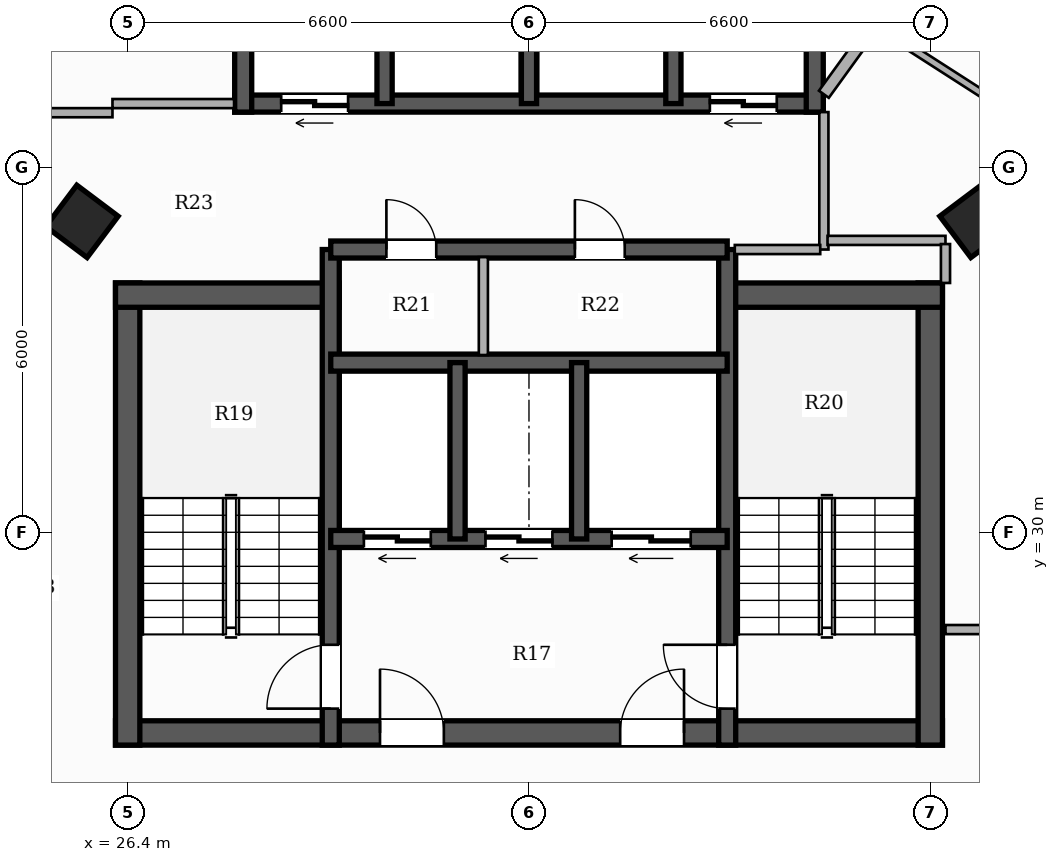
"""IFC4 building model, lengths in metres.
Left out: names, types, materials, properties, quantities, classifications, styles, units other than length and angle.
Written with IfcOpenShell. Run it as: python <this file> out.ifc"""

import sys

from ifc_helpers import new_model, si_unit, direction, frame, frame_2d, origin, origin_2d, place, context, subcontext, project, spatial, rectangle, hollow_rectangle, extrude, element, fill, save


model = new_model("IFC4")
c1 = context("Model", 3, precision=1e-05, world=origin(), true_north=direction((0.0, 1.0)))
c2 = subcontext(c1, "Body", "Model", "MODEL_VIEW")
j1 = project(units=[si_unit("LENGTHUNIT", "METRE"), si_unit("PLANEANGLEUNIT", "RADIAN")], contexts=[c1])
p1 = place(None, origin())
s1 = spatial("IfcSite", under=j1, at=p1, CompositionType="ELEMENT")
p2 = place(p1, origin())
s2 = spatial("IfcBuilding", under=s1, at=p2, CompositionType="ELEMENT")
p3 = place(p2, frame((0.0, 0.0, 173.75)))
s3 = spatial("IfcBuildingStorey", under=s2, at=p3, CompositionType="ELEMENT", Elevation=173.75)
p4 = place(p3, frame((26.2, 26.7, 0.0), z_axis=(0.0, 0.0, 1.0), x_axis=(1.0, 0.0, 0.0)))
e1 = element("IfcWall", 1, at=p4, inside=s3, PredefinedType="SHEAR", context=c2, shape_type="SweptSolid", body=[
    extrude(rectangle(XDim=13.6, YDim=0.4, at=frame_2d((6.8, 0.0))), origin(), (0.0, 0.0, 1.0), 3.3),
])
p5 = place(p4, frame((4.35, 0.0, 0.0)))
e2 = element("IfcOpeningElement", 2, at=p5, cuts=e1, PredefinedType="OPENING", context=c2, shape_type="SweptSolid", body=[
    extrude(rectangle(XDim=1.05, YDim=2.15, at=frame_2d((0.525, 1.075))), frame((0.0, 0.21, 0.0), z_axis=(0.0, -1.0, 0.0), x_axis=(1.0, 0.0, 0.0)), (0.0, 0.0, 1.0), 0.42),
])
p6 = place(p4, frame((8.3, 0.0, 0.0)))
e3 = element("IfcOpeningElement", 3, at=p6, cuts=e1, PredefinedType="OPENING", context=c2, shape_type="SweptSolid", body=[
    extrude(rectangle(XDim=1.05, YDim=2.15, at=frame_2d((0.525, 1.075))), frame((0.0, 0.21, 0.0), z_axis=(0.0, -1.0, 0.0), x_axis=(1.0, 0.0, 0.0)), (0.0, 0.0, 1.0), 0.42),
])
p7 = place(p3, frame((26.4, 26.5, 0.0), z_axis=(0.0, 0.0, 1.0), x_axis=(0.0, 1.0, 0.0)))
e4 = element("IfcWall", 4, at=p7, inside=s3, PredefinedType="SHEAR", context=c2, shape_type="SweptSolid", body=[
    extrude(rectangle(XDim=7.6, YDim=0.4, at=frame_2d((3.8, 0.0))), origin(), (0.0, 0.0, 1.0), 3.3),
])
p8 = place(p3, frame((26.2, 33.9, 0.0), z_axis=(0.0, 0.0, 1.0), x_axis=(1.0, 0.0, 0.0)))
e5 = element("IfcWall", 5, at=p8, inside=s3, PredefinedType="SHEAR", context=c2, shape_type="SweptSolid", body=[
    extrude(rectangle(XDim=3.68, YDim=0.4, at=frame_2d((1.84, 0.0))), origin(), (0.0, 0.0, 1.0), 3.3),
])
p9 = place(p3, frame((39.6, 26.5, 0.0), z_axis=(0.0, 0.0, 1.0), x_axis=(0.0, 1.0, 0.0)))
e6 = element("IfcWall", 6, at=p9, inside=s3, PredefinedType="SHEAR", context=c2, shape_type="SweptSolid", body=[
    extrude(rectangle(XDim=7.6, YDim=0.4, at=frame_2d((3.8, 0.0))), origin(), (0.0, 0.0, 1.0), 3.3),
])
p10 = place(p3, frame((36.12, 33.9, 0.0), z_axis=(0.0, 0.0, 1.0), x_axis=(1.0, 0.0, 0.0)))
e7 = element("IfcWall", 7, at=p10, inside=s3, PredefinedType="SHEAR", context=c2, shape_type="SweptSolid", body=[
    extrude(rectangle(XDim=3.68, YDim=0.4, at=frame_2d((1.84, 0.0))), origin(), (0.0, 0.0, 1.0), 3.3),
])
p11 = place(p3, frame((29.74, 26.5, 0.0), z_axis=(0.0, 0.0, 1.0), x_axis=(0.0, 1.0, 0.0)))
e8 = element("IfcWall", 8, at=p11, inside=s3, PredefinedType="SHEAR", context=c2, shape_type="SweptSolid", body=[
    extrude(rectangle(XDim=8.15, YDim=0.28, at=frame_2d((4.075, 0.0))), origin(), (0.0, 0.0, 1.0), 3.3),
])
p12 = place(p11, frame((0.6, 0.0, 0.0)))
e9 = element("IfcOpeningElement", 9, at=p12, cuts=e8, PredefinedType="OPENING", context=c2, shape_type="SweptSolid", body=[
    extrude(rectangle(XDim=1.05, YDim=2.15, at=frame_2d((0.525, 1.075))), frame((0.0, 0.15, 0.0), z_axis=(0.0, -1.0, 0.0), x_axis=(1.0, 0.0, 0.0)), (0.0, 0.0, 1.0), 0.3),
])
p13 = place(p3, frame((36.26, 26.5, 0.0), z_axis=(0.0, 0.0, 1.0), x_axis=(0.0, 1.0, 0.0)))
e10 = element("IfcWall", 10, at=p13, inside=s3, PredefinedType="SHEAR", context=c2, shape_type="SweptSolid", body=[
    extrude(rectangle(XDim=8.15, YDim=0.28, at=frame_2d((4.075, 0.0))), origin(), (0.0, 0.0, 1.0), 3.3),
])
p14 = place(p13, frame((0.6, 0.0, 0.0)))
e11 = element("IfcOpeningElement", 11, at=p14, cuts=e10, PredefinedType="OPENING", context=c2, shape_type="SweptSolid", body=[
    extrude(rectangle(XDim=1.05, YDim=2.15, at=frame_2d((0.525, 1.075))), frame((0.0, 0.15, 0.0), z_axis=(0.0, -1.0, 0.0), x_axis=(1.0, 0.0, 0.0)), (0.0, 0.0, 1.0), 0.3),
])
p15 = place(p3, frame((36.26, 29.89, 0.0), z_axis=(0.0, 0.0, 1.0), x_axis=(-1.0, 0.0, 0.0)))
e12 = element("IfcWall", 12, at=p15, inside=s3, PredefinedType="SHEAR", context=c2, shape_type="SweptSolid", body=[
    extrude(rectangle(XDim=6.52, YDim=0.28, at=frame_2d((3.26, 0.0))), origin(), (0.0, 0.0, 1.0), 3.3),
])
p16 = place(p15, frame((4.875, 0.0, 0.0)))
e13 = element("IfcOpeningElement", 13, at=p16, cuts=e12, PredefinedType="OPENING", context=c2, shape_type="SweptSolid", body=[
    extrude(rectangle(XDim=1.1, YDim=2.2, at=frame_2d((0.55, 1.1))), frame((0.0, 0.15, 0.0), z_axis=(0.0, -1.0, 0.0), x_axis=(1.0, 0.0, 0.0)), (0.0, 0.0, 1.0), 0.3),
])
p17 = place(p15, frame((2.875, 0.0, 0.0)))
e14 = element("IfcOpeningElement", 14, at=p17, cuts=e12, PredefinedType="OPENING", context=c2, shape_type="SweptSolid", body=[
    extrude(rectangle(XDim=1.1, YDim=2.2, at=frame_2d((0.55, 1.1))), frame((0.0, 0.15, 0.0), z_axis=(0.0, -1.0, 0.0), x_axis=(1.0, 0.0, 0.0)), (0.0, 0.0, 1.0), 0.3),
])
p18 = place(p15, frame((0.6, 0.0, 0.0)))
e15 = element("IfcOpeningElement", 15, at=p18, cuts=e12, PredefinedType="OPENING", context=c2, shape_type="SweptSolid", body=[
    extrude(rectangle(XDim=1.3, YDim=2.2, at=frame_2d((0.65, 1.1))), frame((0.0, 0.15, 0.0), z_axis=(0.0, -1.0, 0.0), x_axis=(1.0, 0.0, 0.0)), (0.0, 0.0, 1.0), 0.3),
])
p19 = place(p3, frame((29.74, 32.79, 0.0), z_axis=(0.0, 0.0, 1.0), x_axis=(1.0, 0.0, 0.0)))
e16 = element("IfcWall", 16, at=p19, inside=s3, PredefinedType="SHEAR", context=c2, shape_type="SweptSolid", body=[
    extrude(rectangle(XDim=6.52, YDim=0.28, at=frame_2d((3.26, 0.0))), origin(), (0.0, 0.0, 1.0), 3.3),
])
for number, where, z_axis, x_axis in (
    (17, (31.825, 29.89, 0.0), (0.0, 0.0, 1.0), (0.0, 1.0, 0.0)),
    (18, (33.825, 29.89, 0.0), (0.0, 0.0, 1.0), (0.0, 1.0, 0.0)),
):
    element("IfcWall", number, at=place(p3, frame(where, z_axis=z_axis, x_axis=x_axis)), inside=s3, PredefinedType="SHEAR", context=c2, shape_type="SweptSolid", body=[
        extrude(rectangle(XDim=2.9, YDim=0.25, at=frame_2d((1.45, 0.0))), origin(), (0.0, 0.0, 1.0), 3.3),
    ])
p20 = place(p3, frame((29.74, 34.65, 0.0), z_axis=(0.0, 0.0, 1.0), x_axis=(1.0, 0.0, 0.0)))
e19 = element("IfcWall", 19, at=p20, inside=s3, PredefinedType="SHEAR", context=c2, shape_type="SweptSolid", body=[
    extrude(rectangle(XDim=6.52, YDim=0.28, at=frame_2d((3.26, 0.0))), origin(), (0.0, 0.0, 1.0), 3.3),
])
p21 = place(p20, frame((0.915, 0.0, 0.0)))
e20 = element("IfcOpeningElement", 20, at=p21, cuts=e19, PredefinedType="OPENING", context=c2, shape_type="SweptSolid", body=[
    extrude(rectangle(XDim=0.82, YDim=2.1, at=frame_2d((0.41, 1.05))), frame((0.0, 0.15, 0.0), z_axis=(0.0, -1.0, 0.0), x_axis=(1.0, 0.0, 0.0)), (0.0, 0.0, 1.0), 0.3),
])
p22 = place(p20, frame((4.015, 0.0, 0.0)))
e21 = element("IfcOpeningElement", 21, at=p22, cuts=e19, PredefinedType="OPENING", context=c2, shape_type="SweptSolid", body=[
    extrude(rectangle(XDim=0.82, YDim=2.1, at=frame_2d((0.41, 1.05))), frame((0.0, 0.15, 0.0), z_axis=(0.0, -1.0, 0.0), x_axis=(1.0, 0.0, 0.0)), (0.0, 0.0, 1.0), 0.3),
])
p23 = place(p3, frame((37.84, 37.05, 0.0), z_axis=(0.0, 0.0, 1.0), x_axis=(-1.0, 0.0, 0.0)))
e22 = element("IfcWall", 22, at=p23, inside=s3, PredefinedType="SHEAR", context=c2, shape_type="SweptSolid", body=[
    extrude(rectangle(XDim=9.68, YDim=0.28, at=frame_2d((4.84, 0.0))), origin(), (0.0, 0.0, 1.0), 3.3),
])
p24 = place(p23, frame((7.815, 0.0, 0.0)))
e23 = element("IfcOpeningElement", 23, at=p24, cuts=e22, PredefinedType="OPENING", context=c2, shape_type="SweptSolid", body=[
    extrude(rectangle(XDim=1.1, YDim=2.2, at=frame_2d((0.55, 1.1))), frame((0.0, 0.15, 0.0), z_axis=(0.0, -1.0, 0.0), x_axis=(1.0, 0.0, 0.0)), (0.0, 0.0, 1.0), 0.3),
])
p25 = place(p23, frame((0.765, 0.0, 0.0)))
e24 = element("IfcOpeningElement", 24, at=p25, cuts=e22, PredefinedType="OPENING", context=c2, shape_type="SweptSolid", body=[
    extrude(rectangle(XDim=1.1, YDim=2.2, at=frame_2d((0.55, 1.1))), frame((0.0, 0.15, 0.0), z_axis=(0.0, -1.0, 0.0), x_axis=(1.0, 0.0, 0.0)), (0.0, 0.0, 1.0), 0.3),
])
for number, where, z_axis, x_axis in (
    (25, (28.3, 36.91, 0.0), (0.0, 0.0, 1.0), (0.0, 1.0, 0.0)),
    (26, (37.7, 36.91, 0.0), (0.0, 0.0, 1.0), (0.0, 1.0, 0.0)),
):
    element("IfcWall", number, at=place(p3, frame(where, z_axis=z_axis, x_axis=x_axis)), inside=s3, PredefinedType="SHEAR", context=c2, shape_type="SweptSolid", body=[
        extrude(rectangle(XDim=2.83, YDim=0.28, at=frame_2d((1.415, 0.0))), origin(), (0.0, 0.0, 1.0), 3.3),
    ])
for number, where, z_axis, x_axis in (
    (27, (30.625, 37.05, 0.0), (0.0, 0.0, 1.0), (0.0, 1.0, 0.0)),
    (28, (33.0, 37.05, 0.0), (0.0, 0.0, 1.0), (0.0, 1.0, 0.0)),
    (29, (35.375, 37.05, 0.0), (0.0, 0.0, 1.0), (0.0, 1.0, 0.0)),
):
    element("IfcWall", number, at=place(p3, frame(where, z_axis=z_axis, x_axis=x_axis)), inside=s3, PredefinedType="SHEAR", context=c2, shape_type="SweptSolid", body=[
        extrude(rectangle(XDim=2.55, YDim=0.25, at=frame_2d((1.275, 0.0))), origin(), (0.0, 0.0, 1.0), 3.3),
    ])
for number, where, z_axis, x_axis in (
    (30, (25.648, 35.113, 0.0), (0.0, 0.0, 1.0), (0.6, 0.8, 0.0)),
    (31, (40.352, 35.113, 0.0), (0.0, 0.0, 1.0), (-0.6, 0.8, 0.0)),
):
    element("IfcColumn", number, at=place(p3, frame(where, z_axis=z_axis, x_axis=x_axis)), inside=s3, PredefinedType="COLUMN", context=c2, shape_type="SweptSolid", body=[
        extrude(hollow_rectangle(XDim=0.85, YDim=0.85, WallThickness=0.028, at=origin_2d()), origin(), (0.0, 0.0, 1.0), 3.3),
    ])
p26 = place(p3, frame((37.85, 34.65, 0.0), z_axis=(0.0, 0.0, 1.0), x_axis=(0.0, 1.0, 0.0)))
e32 = element("IfcWall", 32, at=p26, inside=s3, PredefinedType="PARTITIONING", context=c2, shape_type="SweptSolid", body=[
    extrude(rectangle(XDim=2.26, YDim=0.15, at=frame_2d((1.13, 0.0))), origin(), (0.0, 0.0, 1.0), 3.06),
])
p27 = place(p3, frame((36.385, 34.65, 0.0), z_axis=(0.0, 0.0, 1.0), x_axis=(1.0, 0.0, 0.0)))
e33 = element("IfcWall", 33, at=p27, inside=s3, PredefinedType="PARTITIONING", context=c2, shape_type="SweptSolid", body=[
    extrude(rectangle(XDim=1.405, YDim=0.15, at=frame_2d((0.703, 0.0))), origin(), (0.0, 0.0, 1.0), 2.425),
])
p28 = place(p3, frame((32.25, 32.915, 0.0), z_axis=(0.0, 0.0, 1.0), x_axis=(0.0, 1.0, 0.0)))
e34 = element("IfcWall", 34, at=p28, inside=s3, PredefinedType="PARTITIONING", context=c2, shape_type="SweptSolid", body=[
    extrude(rectangle(XDim=1.61, YDim=0.15, at=frame_2d((0.805, 0.0))), origin(), (0.0, 0.0, 1.0), 3.06),
])
p29 = place(p3, frame((23.56, 36.9, 0.0), z_axis=(0.0, 0.0, 1.0), x_axis=(1.0, 0.0, 0.0)))
e35 = element("IfcWall", 35, at=p29, inside=s3, PredefinedType="PARTITIONING", context=c2, shape_type="SweptSolid", body=[
    extrude(rectangle(XDim=2.59, YDim=0.15, at=frame_2d((1.295, 0.0))), origin(), (0.0, 0.0, 1.0), 2.413),
])
p30 = place(p29, frame((0.515, 0.0, 0.0)))
e36 = element("IfcOpeningElement", 36, at=p30, cuts=e35, PredefinedType="OPENING", context=c2, shape_type="SweptSolid", body=[
    extrude(rectangle(XDim=0.88, YDim=2.1, at=frame_2d((0.44, 1.05))), frame((0.0, 0.085, 0.0), z_axis=(0.0, -1.0, 0.0), x_axis=(1.0, 0.0, 0.0)), (0.0, 0.0, 1.0), 0.17),
])
p31 = place(p3, frame((39.85, 28.4, 0.0), z_axis=(0.0, 0.0, 1.0), x_axis=(1.0, 0.0, 0.0)))
e37 = element("IfcWall", 37, at=p31, inside=s3, PredefinedType="PARTITIONING", context=c2, shape_type="SweptSolid", body=[
    extrude(rectangle(XDim=2.5, YDim=0.15, at=frame_2d((1.25, 0.0))), origin(), (0.0, 0.0, 1.0), 2.721),
])
p32 = place(p3, frame((26.15, 37.05, 0.0), z_axis=(0.0, 0.0, 1.0), x_axis=(1.0, 0.0, 0.0)))
e38 = element("IfcWall", 38, at=p32, inside=s3, PredefinedType="PARTITIONING", context=c2, shape_type="SweptSolid", body=[
    extrude(rectangle(XDim=2.0, YDim=0.15, at=frame_2d((1.0, 0.0))), origin(), (0.0, 0.0, 1.0), 2.413),
])
p33 = place(p3, frame((37.91, 34.8, 0.0), z_axis=(0.0, 0.0, 1.0), x_axis=(1.0, 0.0, 0.0)))
e39 = element("IfcWall", 39, at=p33, inside=s3, PredefinedType="PARTITIONING", context=c2, shape_type="SweptSolid", body=[
    extrude(rectangle(XDim=1.94, YDim=0.15, at=frame_2d((0.97, 0.0))), origin(), (0.0, 0.0, 1.0), 2.721),
])
p34 = place(p3, frame((39.85, 34.74, 0.0), z_axis=(0.0, 0.0, 1.0), x_axis=(0.0, -1.0, 0.0)))
e40 = element("IfcWall", 40, at=p34, inside=s3, PredefinedType="PARTITIONING", context=c2, shape_type="SweptSolid", body=[
    extrude(rectangle(XDim=0.64, YDim=0.15, at=frame_2d((0.32, 0.0))), origin(), (0.0, 0.0, 1.0), 2.721),
])
p35 = place(p3, frame((37.85, 37.203, 0.0), z_axis=(0.0, 0.0, 1.0), x_axis=(0.586236886407, 0.810139687348, 0.0)))
e41 = element("IfcWall", 41, at=p35, inside=s3, PredefinedType="PARTITIONING", context=c2, shape_type="SweptSolid", body=[
    extrude(rectangle(XDim=4.048, YDim=0.2, at=frame_2d((2.024, 0.0))), origin(), (0.0, 0.0, 1.0), 2.413),
])
p36 = place(p3, frame((38.752, 38.305, 0.0), z_axis=(0.0, 0.0, 1.0), x_axis=(0.84140799898, -0.54040038791, 0.0)))
e42 = element("IfcWall", 42, at=p36, inside=s3, PredefinedType="PARTITIONING", context=c2, shape_type="SweptSolid", body=[
    extrude(rectangle(XDim=7.013, YDim=0.12, at=frame_2d((3.507, 0.0))), origin(), (0.0, 0.0, 1.0), 2.413),
])
p37 = place(p36, frame((3.816, 0.0, 0.0)))
e43 = element("IfcOpeningElement", 43, at=p37, cuts=e42, PredefinedType="OPENING", context=c2, shape_type="SweptSolid", body=[
    extrude(rectangle(XDim=0.88, YDim=2.1, at=frame_2d((0.44, 1.05))), frame((0.0, 0.07, 0.0), z_axis=(0.0, -1.0, 0.0), x_axis=(1.0, 0.0, 0.0)), (0.0, 0.0, 1.0), 0.14),
])
p38 = place(p12, origin())
e44 = element("IfcDoor", 44, at=p38, inside=s3, OperationType="SINGLE_SWING_LEFT", PredefinedType="DOOR", context=c2, shape_type="SweptSolid", body=[
    extrude(rectangle(XDim=1.05, YDim=2.15, at=frame_2d((0.525, 1.075))), frame((0.0, 0.025, 0.0), z_axis=(0.0, -1.0, 0.0), x_axis=(1.0, 0.0, 0.0)), (0.0, 0.0, 1.0), 0.05),
])
fill(e9, e44)
p39 = place(p14, origin())
e45 = element("IfcDoor", 45, at=p39, inside=s3, OperationType="SINGLE_SWING_RIGHT", PredefinedType="DOOR", context=c2, shape_type="SweptSolid", body=[
    extrude(rectangle(XDim=1.05, YDim=2.15, at=frame_2d((0.525, 1.075))), frame((0.0, 0.025, 0.0), z_axis=(0.0, -1.0, 0.0), x_axis=(1.0, 0.0, 0.0)), (0.0, 0.0, 1.0), 0.05),
])
fill(e11, e45)
p40 = place(p5, origin())
e46 = element("IfcDoor", 46, at=p40, inside=s3, OperationType="SINGLE_SWING_LEFT", PredefinedType="DOOR", context=c2, shape_type="SweptSolid", body=[
    extrude(rectangle(XDim=1.05, YDim=2.15, at=frame_2d((0.525, 1.075))), frame((0.0, 0.025, 0.0), z_axis=(0.0, -1.0, 0.0), x_axis=(1.0, 0.0, 0.0)), (0.0, 0.0, 1.0), 0.05),
])
fill(e2, e46)
p41 = place(p6, origin())
e47 = element("IfcDoor", 47, at=p41, inside=s3, OperationType="SINGLE_SWING_RIGHT", PredefinedType="DOOR", context=c2, shape_type="SweptSolid", body=[
    extrude(rectangle(XDim=1.05, YDim=2.15, at=frame_2d((0.525, 1.075))), frame((0.0, 0.025, 0.0), z_axis=(0.0, -1.0, 0.0), x_axis=(1.0, 0.0, 0.0)), (0.0, 0.0, 1.0), 0.05),
])
fill(e3, e47)
p42 = place(p16, origin())
e48 = element("IfcDoor", 48, at=p42, inside=s3, OperationType="DOUBLE_DOOR_SLIDING", PredefinedType="DOOR", context=c2, shape_type="SweptSolid", body=[
    extrude(rectangle(XDim=1.1, YDim=2.2, at=frame_2d((0.55, 1.1))), frame((0.0, 0.025, 0.0), z_axis=(0.0, -1.0, 0.0), x_axis=(1.0, 0.0, 0.0)), (0.0, 0.0, 1.0), 0.05),
])
fill(e13, e48)
p43 = place(p17, origin())
e49 = element("IfcDoor", 49, at=p43, inside=s3, OperationType="DOUBLE_DOOR_SLIDING", PredefinedType="DOOR", context=c2, shape_type="SweptSolid", body=[
    extrude(rectangle(XDim=1.1, YDim=2.2, at=frame_2d((0.55, 1.1))), frame((0.0, 0.025, 0.0), z_axis=(0.0, -1.0, 0.0), x_axis=(1.0, 0.0, 0.0)), (0.0, 0.0, 1.0), 0.05),
])
fill(e14, e49)
p44 = place(p18, origin())
e50 = element("IfcDoor", 50, at=p44, inside=s3, OperationType="DOUBLE_DOOR_SLIDING", PredefinedType="DOOR", context=c2, shape_type="SweptSolid", body=[
    extrude(rectangle(XDim=1.3, YDim=2.2, at=frame_2d((0.65, 1.1))), frame((0.0, 0.025, 0.0), z_axis=(0.0, -1.0, 0.0), x_axis=(1.0, 0.0, 0.0)), (0.0, 0.0, 1.0), 0.05),
])
fill(e15, e50)
p45 = place(p24, origin())
e51 = element("IfcDoor", 51, at=p45, inside=s3, OperationType="DOUBLE_DOOR_SLIDING", PredefinedType="DOOR", context=c2, shape_type="SweptSolid", body=[
    extrude(rectangle(XDim=1.1, YDim=2.2, at=frame_2d((0.55, 1.1))), frame((0.0, 0.025, 0.0), z_axis=(0.0, -1.0, 0.0), x_axis=(1.0, 0.0, 0.0)), (0.0, 0.0, 1.0), 0.05),
])
fill(e23, e51)
p46 = place(p25, origin())
e52 = element("IfcDoor", 52, at=p46, inside=s3, OperationType="DOUBLE_DOOR_SLIDING", PredefinedType="DOOR", context=c2, shape_type="SweptSolid", body=[
    extrude(rectangle(XDim=1.1, YDim=2.2, at=frame_2d((0.55, 1.1))), frame((0.0, 0.025, 0.0), z_axis=(0.0, -1.0, 0.0), x_axis=(1.0, 0.0, 0.0)), (0.0, 0.0, 1.0), 0.05),
])
fill(e24, e52)
p47 = place(p21, origin())
e53 = element("IfcDoor", 53, at=p47, inside=s3, OperationType="SINGLE_SWING_LEFT", PredefinedType="DOOR", context=c2, shape_type="SweptSolid", body=[
    extrude(rectangle(XDim=0.82, YDim=2.1, at=frame_2d((0.41, 1.05))), frame((0.0, 0.025, 0.0), z_axis=(0.0, -1.0, 0.0), x_axis=(1.0, 0.0, 0.0)), (0.0, 0.0, 1.0), 0.05),
])
fill(e20, e53)
p48 = place(p22, origin())
e54 = element("IfcDoor", 54, at=p48, inside=s3, OperationType="SINGLE_SWING_LEFT", PredefinedType="DOOR", context=c2, shape_type="SweptSolid", body=[
    extrude(rectangle(XDim=0.82, YDim=2.1, at=frame_2d((0.41, 1.05))), frame((0.0, 0.025, 0.0), z_axis=(0.0, -1.0, 0.0), x_axis=(1.0, 0.0, 0.0)), (0.0, 0.0, 1.0), 0.05),
])
fill(e21, e54)
save(model, sys.argv[1])
